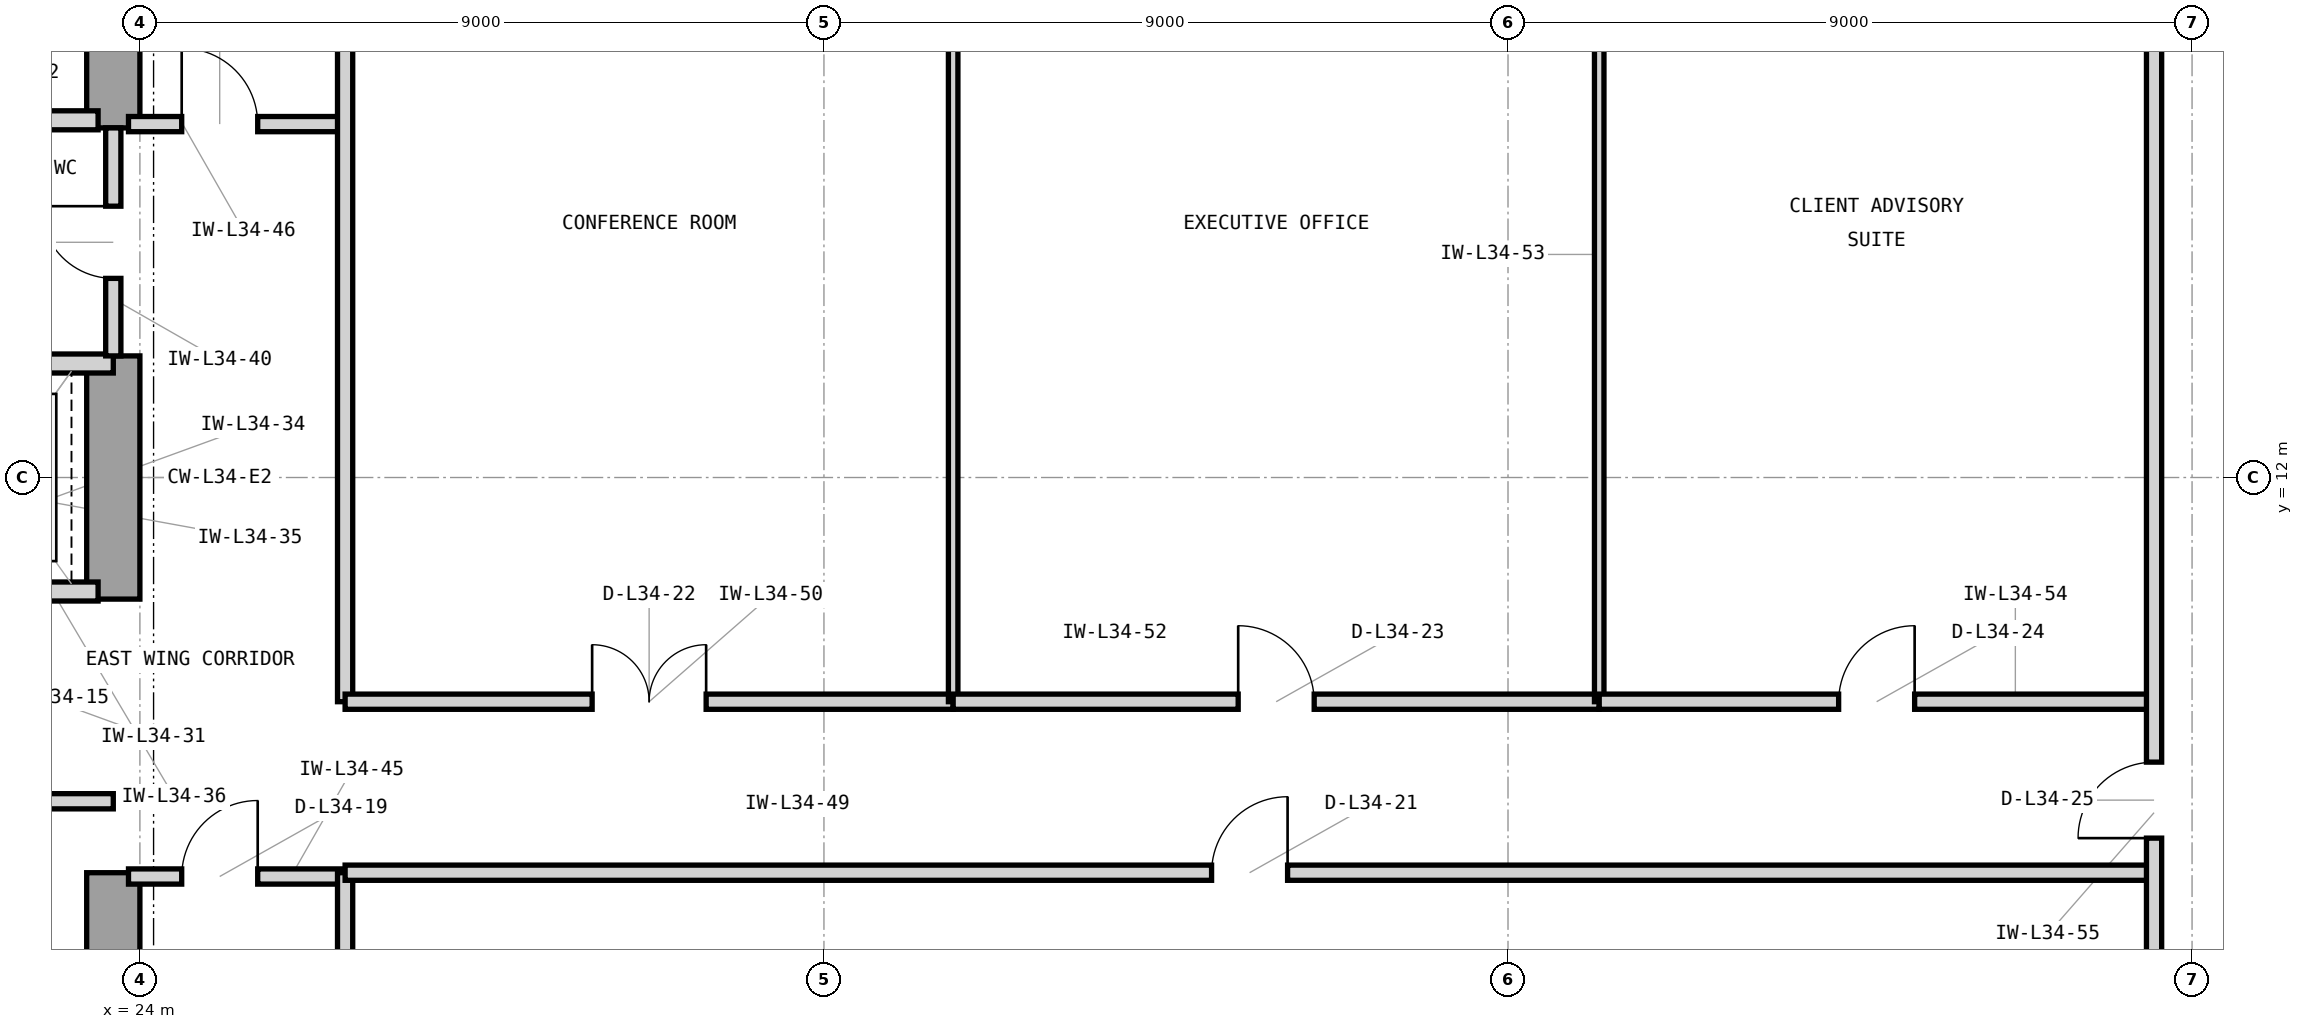
"""IFC4 building model, lengths in metres.
Left out: names, types, materials, properties, quantities, classifications, styles, units other than length and angle.
Written with IfcOpenShell. Run it as: python <this file> out.ifc"""

import sys

from ifc_helpers import new_model, si_unit, direction, frame, frame_2d, origin, place, context, subcontext, project, spatial, rectangle, extrude, element, fill, save


model = new_model("IFC4")
c1 = context("Model", 3, precision=1e-05, world=origin(), true_north=direction((0.0, 1.0)))
c2 = subcontext(c1, "Body", "Model", "MODEL_VIEW")
j1 = project(units=[si_unit("LENGTHUNIT", "METRE"), si_unit("PLANEANGLEUNIT", "RADIAN")], contexts=[c1])
p1 = place(None, origin())
s1 = spatial("IfcSite", under=j1, at=p1, CompositionType="ELEMENT")
p2 = place(p1, origin())
s2 = spatial("IfcBuilding", under=s1, at=p2, CompositionType="ELEMENT")
p3 = place(p2, frame((0.0, 0.0, 144.0)))
s3 = spatial("IfcBuildingStorey", under=s2, at=p3, CompositionType="ELEMENT", Elevation=144.0)
p4 = place(p3, frame((23.65, 3.7, 0.0), z_axis=(0.0, 0.0, 1.0), x_axis=(0.0, 1.0, 0.0)))
e1 = element("IfcWall", 1, at=p4, inside=s3, PredefinedType="SHEAR", context=c2, shape_type="SweptSolid", body=[
    extrude(rectangle(XDim=3.1, YDim=0.7, at=frame_2d((1.55, 0.0))), origin(), (0.0, 0.0, 1.0), 3.9),
])
p5 = place(p3, frame((23.65, 10.4, 0.0), z_axis=(0.0, 0.0, 1.0), x_axis=(0.0, 1.0, 0.0)))
e2 = element("IfcWall", 2, at=p5, inside=s3, PredefinedType="SHEAR", context=c2, shape_type="SweptSolid", body=[
    extrude(rectangle(XDim=3.2, YDim=0.7, at=frame_2d((1.6, 0.0))), origin(), (0.0, 0.0, 1.0), 3.9),
])
p6 = place(p3, frame((23.65, 16.6, 0.0), z_axis=(0.0, 0.0, 1.0), x_axis=(0.0, 1.0, 0.0)))
e3 = element("IfcWall", 3, at=p6, inside=s3, PredefinedType="SHEAR", context=c2, shape_type="SweptSolid", body=[
    extrude(rectangle(XDim=4.05, YDim=0.7, at=frame_2d((2.025, 0.0))), origin(), (0.0, 0.0, 1.0), 3.9),
])
p7 = place(p3, frame((21.05, 16.7, 0.0), z_axis=(0.0, 0.0, 1.0), x_axis=(1.0, 0.0, 0.0)))
e4 = element("IfcWall", 4, at=p7, inside=s3, PredefinedType="PARTITIONING", context=c2, shape_type="SweptSolid", body=[
    extrude(rectangle(XDim=2.4, YDim=0.25, at=frame_2d((1.2, 0.0))), origin(), (0.0, 0.0, 1.0), 3.233),
])
p8 = place(p3, frame((17.5, 7.74, 0.0), z_axis=(0.0, 0.0, 1.0), x_axis=(1.0, 0.0, 0.0)))
e5 = element("IfcWall", 5, at=p8, inside=s3, PredefinedType="PARTITIONING", context=c2, shape_type="SweptSolid", body=[
    extrude(rectangle(XDim=6.15, YDim=0.2, at=frame_2d((3.075, 0.0))), origin(), (0.0, 0.0, 1.0), 3.69),
])
p9 = place(p8, frame((2.575, 0.0, 0.0)))
e6 = element("IfcOpeningElement", 6, at=p9, cuts=e5, PredefinedType="OPENING", context=c2, shape_type="SweptSolid", body=[
    extrude(rectangle(XDim=1.0, YDim=2.15, at=frame_2d((0.5, 1.075))), frame((0.0, 0.11, 0.0), z_axis=(0.0, -1.0, 0.0), x_axis=(1.0, 0.0, 0.0)), (0.0, 0.0, 1.0), 0.22),
])
p10 = place(p3, frame((21.05, 10.5, 0.0), z_axis=(0.0, 0.0, 1.0), x_axis=(1.0, 0.0, 0.0)))
e7 = element("IfcWall", 7, at=p10, inside=s3, PredefinedType="PARTITIONING", context=c2, shape_type="SweptSolid", body=[
    extrude(rectangle(XDim=2.4, YDim=0.25, at=frame_2d((1.2, 0.0))), origin(), (0.0, 0.0, 1.0), 3.233),
])
p11 = place(p10, frame((0.48, 0.0, 0.0)))
e8 = element("IfcOpeningElement", 8, at=p11, cuts=e7, PredefinedType="OPENING", context=c2, shape_type="SweptSolid", body=[
    extrude(rectangle(XDim=1.15, YDim=2.25, at=frame_2d((0.575, 1.125))), frame((0.0, 0.135, 0.0), z_axis=(0.0, -1.0, 0.0), x_axis=(1.0, 0.0, 0.0)), (0.0, 0.0, 1.0), 0.27),
])
p12 = place(p3, frame((14.7, 13.5, 0.0), z_axis=(0.0, 0.0, 1.0), x_axis=(1.0, 0.0, 0.0)))
e9 = element("IfcWall", 9, at=p12, inside=s3, PredefinedType="PARTITIONING", context=c2, shape_type="SweptSolid", body=[
    extrude(rectangle(XDim=8.95, YDim=0.25, at=frame_2d((4.475, 0.0))), origin(), (0.0, 0.0, 1.0), 3.233),
])
p13 = place(p3, frame((23.65, 13.6, 0.0), z_axis=(0.0, 0.0, 1.0), x_axis=(0.0, 1.0, 0.0)))
e10 = element("IfcWall", 10, at=p13, inside=s3, PredefinedType="PARTITIONING", context=c2, shape_type="SweptSolid", body=[
    extrude(rectangle(XDim=3.0, YDim=0.2, at=frame_2d((1.5, 0.0))), origin(), (0.0, 0.0, 1.0), 3.69),
])
p14 = place(p13, frame((1.02, 0.0, 0.0)))
e11 = element("IfcOpeningElement", 11, at=p14, cuts=e10, PredefinedType="OPENING", context=c2, shape_type="SweptSolid", body=[
    extrude(rectangle(XDim=0.95, YDim=2.1, at=frame_2d((0.475, 1.05))), frame((0.0, 0.11, 0.0), z_axis=(0.0, -1.0, 0.0), x_axis=(1.0, 0.0, 0.0)), (0.0, 0.0, 1.0), 0.22),
])
p15 = place(p3, frame((23.85, 6.75, 0.0), z_axis=(0.0, 0.0, 1.0), x_axis=(1.0, 0.0, 0.0)))
e12 = element("IfcWall", 12, at=p15, inside=s3, PredefinedType="PARTITIONING", context=c2, shape_type="SweptSolid", body=[
    extrude(rectangle(XDim=2.85, YDim=0.2, at=frame_2d((1.425, 0.0))), origin(), (0.0, 0.0, 1.0), 3.69),
])
p16 = place(p15, frame((0.7, 0.0, 0.0)))
e13 = element("IfcOpeningElement", 13, at=p16, cuts=e12, PredefinedType="OPENING", context=c2, shape_type="SweptSolid", body=[
    extrude(rectangle(XDim=1.0, YDim=2.15, at=frame_2d((0.5, 1.075))), frame((0.0, 0.11, 0.0), z_axis=(0.0, -1.0, 0.0), x_axis=(1.0, 0.0, 0.0)), (0.0, 0.0, 1.0), 0.22),
])
p17 = place(p3, frame((23.85, 16.65, 0.0), z_axis=(0.0, 0.0, 1.0), x_axis=(1.0, 0.0, 0.0)))
e14 = element("IfcWall", 14, at=p17, inside=s3, PredefinedType="PARTITIONING", context=c2, shape_type="SweptSolid", body=[
    extrude(rectangle(XDim=2.85, YDim=0.2, at=frame_2d((1.425, 0.0))), origin(), (0.0, 0.0, 1.0), 3.69),
])
p18 = place(p17, frame((0.7, 0.0, 0.0)))
e15 = element("IfcOpeningElement", 15, at=p18, cuts=e14, PredefinedType="OPENING", context=c2, shape_type="SweptSolid", body=[
    extrude(rectangle(XDim=1.0, YDim=2.15, at=frame_2d((0.5, 1.075))), frame((0.0, 0.11, 0.0), z_axis=(0.0, -1.0, 0.0), x_axis=(1.0, 0.0, 0.0)), (0.0, 0.0, 1.0), 0.22),
])
p19 = place(p3, frame((26.7, 3.18, 0.0), z_axis=(0.0, 0.0, 1.0), x_axis=(0.0, 1.0, 0.0)))
e16 = element("IfcWall", 16, at=p19, inside=s3, PredefinedType="PARTITIONING", context=c2, shape_type="SweptSolid", body=[
    extrude(rectangle(XDim=3.62, YDim=0.2, at=frame_2d((1.81, 0.0))), origin(), (0.0, 0.0, 1.0), 3.69),
])
p20 = place(p3, frame((26.7, 9.05, 0.0), z_axis=(0.0, 0.0, 1.0), x_axis=(0.0, 1.0, 0.0)))
e17 = element("IfcWall", 17, at=p20, inside=s3, PredefinedType="PARTITIONING", context=c2, shape_type="SweptSolid", body=[
    extrude(rectangle(XDim=11.77, YDim=0.2, at=frame_2d((5.885, 0.0))), origin(), (0.0, 0.0, 1.0), 3.69),
])
p21 = place(p3, frame((26.7, 6.8, 0.0), z_axis=(0.0, 0.0, 1.0), x_axis=(1.0, 0.0, 0.0)))
e18 = element("IfcWall", 18, at=p21, inside=s3, PredefinedType="PARTITIONING", context=c2, shape_type="SweptSolid", body=[
    extrude(rectangle(XDim=23.8, YDim=0.2, at=frame_2d((11.9, 0.0))), origin(), (0.0, 0.0, 1.0), 3.69),
])
p22 = place(p21, frame((11.4, 0.0, 0.0)))
e19 = element("IfcOpeningElement", 19, at=p22, cuts=e18, PredefinedType="OPENING", context=c2, shape_type="SweptSolid", body=[
    extrude(rectangle(XDim=1.0, YDim=2.15, at=frame_2d((0.5, 1.075))), frame((0.0, 0.11, 0.0), z_axis=(0.0, -1.0, 0.0), x_axis=(1.0, 0.0, 0.0)), (0.0, 0.0, 1.0), 0.22),
])
p23 = place(p3, frame((26.7, 9.05, 0.0), z_axis=(0.0, 0.0, 1.0), x_axis=(1.0, 0.0, 0.0)))
e20 = element("IfcWall", 20, at=p23, inside=s3, PredefinedType="PARTITIONING", context=c2, shape_type="SweptSolid", body=[
    extrude(rectangle(XDim=8.0, YDim=0.2, at=frame_2d((4.0, 0.0))), origin(), (0.0, 0.0, 1.0), 3.233),
])
p24 = place(p23, frame((3.25, 0.0, 0.0)))
e21 = element("IfcOpeningElement", 21, at=p24, cuts=e20, PredefinedType="OPENING", context=c2, shape_type="SweptSolid", body=[
    extrude(rectangle(XDim=1.5, YDim=2.3, at=frame_2d((0.75, 1.15))), frame((0.0, 0.11, 0.0), z_axis=(0.0, -1.0, 0.0), x_axis=(1.0, 0.0, 0.0)), (0.0, 0.0, 1.0), 0.22),
])
p25 = place(p3, frame((34.7, 9.05, 0.0), z_axis=(0.0, 0.0, 1.0), x_axis=(0.0, 1.0, 0.0)))
e22 = element("IfcWall", 22, at=p25, inside=s3, PredefinedType="PARTITIONING", context=c2, shape_type="SweptSolid", body=[
    extrude(rectangle(XDim=11.77, YDim=0.125, at=frame_2d((5.885, 0.0))), origin(), (0.0, 0.0, 1.0), 3.69),
])
p26 = place(p3, frame((34.7, 9.05, 0.0), z_axis=(0.0, 0.0, 1.0), x_axis=(1.0, 0.0, 0.0)))
e23 = element("IfcWall", 23, at=p26, inside=s3, PredefinedType="PARTITIONING", context=c2, shape_type="SweptSolid", body=[
    extrude(rectangle(XDim=8.5, YDim=0.2, at=frame_2d((4.25, 0.0))), origin(), (0.0, 0.0, 1.0), 3.233),
])
p27 = place(p26, frame((3.75, 0.0, 0.0)))
e24 = element("IfcOpeningElement", 24, at=p27, cuts=e23, PredefinedType="OPENING", context=c2, shape_type="SweptSolid", body=[
    extrude(rectangle(XDim=1.0, YDim=2.15, at=frame_2d((0.5, 1.075))), frame((0.0, 0.11, 0.0), z_axis=(0.0, -1.0, 0.0), x_axis=(1.0, 0.0, 0.0)), (0.0, 0.0, 1.0), 0.22),
])
p28 = place(p3, frame((43.2, 9.05, 0.0), z_axis=(0.0, 0.0, 1.0), x_axis=(0.0, 1.0, 0.0)))
e25 = element("IfcWall", 25, at=p28, inside=s3, PredefinedType="PARTITIONING", context=c2, shape_type="SweptSolid", body=[
    extrude(rectangle(XDim=11.77, YDim=0.125, at=frame_2d((5.885, 0.0))), origin(), (0.0, 0.0, 1.0), 3.69),
])
p29 = place(p3, frame((43.2, 9.05, 0.0), z_axis=(0.0, 0.0, 1.0), x_axis=(1.0, 0.0, 0.0)))
e26 = element("IfcWall", 26, at=p29, inside=s3, PredefinedType="PARTITIONING", context=c2, shape_type="SweptSolid", body=[
    extrude(rectangle(XDim=7.3, YDim=0.2, at=frame_2d((3.65, 0.0))), origin(), (0.0, 0.0, 1.0), 3.233),
])
p30 = place(p29, frame((3.15, 0.0, 0.0)))
e27 = element("IfcOpeningElement", 27, at=p30, cuts=e26, PredefinedType="OPENING", context=c2, shape_type="SweptSolid", body=[
    extrude(rectangle(XDim=1.0, YDim=2.15, at=frame_2d((0.5, 1.075))), frame((0.0, 0.11, 0.0), z_axis=(0.0, -1.0, 0.0), x_axis=(1.0, 0.0, 0.0)), (0.0, 0.0, 1.0), 0.22),
])
p31 = place(p3, frame((50.5, 3.18, 0.0), z_axis=(0.0, 0.0, 1.0), x_axis=(0.0, 1.0, 0.0)))
e28 = element("IfcWall", 28, at=p31, inside=s3, PredefinedType="PARTITIONING", context=c2, shape_type="SweptSolid", body=[
    extrude(rectangle(XDim=17.64, YDim=0.2, at=frame_2d((8.82, 0.0))), origin(), (0.0, 0.0, 1.0), 3.69),
])
p32 = place(p31, frame((4.075, 0.0, 0.0)))
e29 = element("IfcOpeningElement", 29, at=p32, cuts=e28, PredefinedType="OPENING", context=c2, shape_type="SweptSolid", body=[
    extrude(rectangle(XDim=1.0, YDim=2.15, at=frame_2d((0.5, 1.075))), frame((0.0, 0.11, 0.0), z_axis=(0.0, -1.0, 0.0), x_axis=(1.0, 0.0, 0.0)), (0.0, 0.0, 1.0), 0.22),
])
p33 = place(p14, origin())
e30 = element("IfcDoor", 30, at=p33, inside=s3, OperationType="SINGLE_SWING_RIGHT", PredefinedType="DOOR", context=c2, shape_type="SweptSolid", body=[
    extrude(rectangle(XDim=0.95, YDim=2.1, at=frame_2d((0.475, 1.05))), frame((0.0, 0.025, 0.0), z_axis=(0.0, -1.0, 0.0), x_axis=(1.0, 0.0, 0.0)), (0.0, 0.0, 1.0), 0.05),
])
fill(e11, e30)
p34 = place(p16, origin())
e31 = element("IfcDoor", 31, at=p34, inside=s3, OperationType="SINGLE_SWING_RIGHT", PredefinedType="DOOR", context=c2, shape_type="SweptSolid", body=[
    extrude(rectangle(XDim=1.0, YDim=2.15, at=frame_2d((0.5, 1.075))), frame((0.0, 0.025, 0.0), z_axis=(0.0, -1.0, 0.0), x_axis=(1.0, 0.0, 0.0)), (0.0, 0.0, 1.0), 0.05),
])
fill(e13, e31)
p35 = place(p18, origin())
e32 = element("IfcDoor", 32, at=p35, inside=s3, OperationType="SINGLE_SWING_LEFT", PredefinedType="DOOR", context=c2, shape_type="SweptSolid", body=[
    extrude(rectangle(XDim=1.0, YDim=2.15, at=frame_2d((0.5, 1.075))), frame((0.0, 0.025, 0.0), z_axis=(0.0, -1.0, 0.0), x_axis=(1.0, 0.0, 0.0)), (0.0, 0.0, 1.0), 0.05),
])
fill(e15, e32)
p36 = place(p22, origin())
e33 = element("IfcDoor", 33, at=p36, inside=s3, OperationType="SINGLE_SWING_RIGHT", PredefinedType="DOOR", context=c2, shape_type="SweptSolid", body=[
    extrude(rectangle(XDim=1.0, YDim=2.15, at=frame_2d((0.5, 1.075))), frame((0.0, 0.025, 0.0), z_axis=(0.0, -1.0, 0.0), x_axis=(1.0, 0.0, 0.0)), (0.0, 0.0, 1.0), 0.05),
])
fill(e19, e33)
p37 = place(p24, origin())
e34 = element("IfcDoor", 34, at=p37, inside=s3, OperationType="DOUBLE_DOOR_SINGLE_SWING", PredefinedType="DOOR", context=c2, shape_type="SweptSolid", body=[
    extrude(rectangle(XDim=1.5, YDim=2.3, at=frame_2d((0.75, 1.15))), frame((0.0, 0.025, 0.0), z_axis=(0.0, -1.0, 0.0), x_axis=(1.0, 0.0, 0.0)), (0.0, 0.0, 1.0), 0.05),
])
fill(e21, e34)
p38 = place(p27, origin())
e35 = element("IfcDoor", 35, at=p38, inside=s3, OperationType="SINGLE_SWING_LEFT", PredefinedType="DOOR", context=c2, shape_type="SweptSolid", body=[
    extrude(rectangle(XDim=1.0, YDim=2.15, at=frame_2d((0.5, 1.075))), frame((0.0, 0.025, 0.0), z_axis=(0.0, -1.0, 0.0), x_axis=(1.0, 0.0, 0.0)), (0.0, 0.0, 1.0), 0.05),
])
fill(e24, e35)
p39 = place(p30, origin())
e36 = element("IfcDoor", 36, at=p39, inside=s3, OperationType="SINGLE_SWING_RIGHT", PredefinedType="DOOR", context=c2, shape_type="SweptSolid", body=[
    extrude(rectangle(XDim=1.0, YDim=2.15, at=frame_2d((0.5, 1.075))), frame((0.0, 0.025, 0.0), z_axis=(0.0, -1.0, 0.0), x_axis=(1.0, 0.0, 0.0)), (0.0, 0.0, 1.0), 0.05),
])
fill(e27, e36)
p40 = place(p32, origin())
e37 = element("IfcDoor", 37, at=p40, inside=s3, OperationType="SINGLE_SWING_LEFT", PredefinedType="DOOR", context=c2, shape_type="SweptSolid", body=[
    extrude(rectangle(XDim=1.0, YDim=2.15, at=frame_2d((0.5, 1.075))), frame((0.0, 0.025, 0.0), z_axis=(0.0, -1.0, 0.0), x_axis=(1.0, 0.0, 0.0)), (0.0, 0.0, 1.0), 0.05),
])
fill(e29, e37)
save(model, sys.argv[1])
